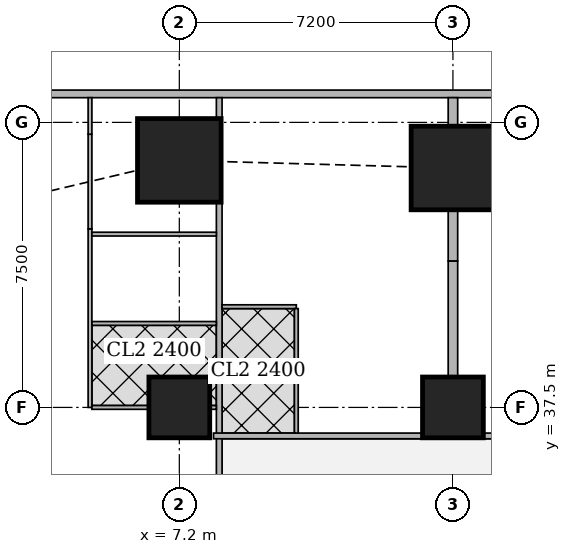
"""IFC4 building model, lengths in metres.
Left out: names, types, materials, properties, quantities, classifications, styles, units other than length and angle.
Written with IfcOpenShell. Run it as: python <this file> out.ifc"""

import sys

from ifc_helpers import new_model, si_unit, direction, frame, frame_2d, origin, origin_2d, place, context, subcontext, project, spatial, rectangle, extrude, element, fill, save


model = new_model("IFC4")
c1 = context("Model", 3, precision=1e-05, world=origin(), true_north=direction((0.0, 1.0)))
c2 = subcontext(c1, "Body", "Model", "MODEL_VIEW")
j1 = project(units=[si_unit("LENGTHUNIT", "METRE"), si_unit("PLANEANGLEUNIT", "RADIAN")], contexts=[c1])
p1 = place(None, origin())
s1 = spatial("IfcSite", under=j1, at=p1, CompositionType="ELEMENT")
p2 = place(p1, origin())
s2 = spatial("IfcBuilding", under=s1, at=p2, CompositionType="ELEMENT")
p3 = place(p2, frame((0.0, 0.0, 81.65)))
s3 = spatial("IfcBuildingStorey", under=s2, at=p3, CompositionType="ELEMENT", Elevation=81.65)
for number, where, z_axis, x_axis in (
    (1, (7.2, 37.5, 0.0), (0.0, 0.0, 1.0), (1.0, 0.0, 0.0)),
    (2, (14.4, 37.5, 0.0), (0.0, 0.0, 1.0), (1.0, 0.0, 0.0)),
):
    element("IfcColumn", number, at=place(p3, frame(where, z_axis=z_axis, x_axis=x_axis)), inside=s3, PredefinedType="COLUMN", context=c2, shape_type="SweptSolid", body=[
        extrude(rectangle(XDim=1.6, YDim=1.6, at=origin_2d()), origin(), (0.0, 0.0, 1.0), 3.75),
    ])
for number, where, z_axis, x_axis in (
    (3, (7.2, 44.0, 0.0), (0.0, 0.0, 1.0), (1.0, 0.0, 0.0)),
    (4, (14.4, 43.8, 0.0), (0.0, 0.0, 1.0), (1.0, 0.0, 0.0)),
):
    element("IfcColumn", number, at=place(p3, frame(where, z_axis=z_axis, x_axis=x_axis)), inside=s3, PredefinedType="COLUMN", context=c2, shape_type="SweptSolid", body=[
        extrude(rectangle(XDim=2.2, YDim=2.2, at=origin_2d()), origin(), (0.0, 0.0, 1.0), 3.75),
    ])
p4 = place(p3, frame((40.106, 45.75, 0.0), z_axis=(0.0, 0.0, 1.0), x_axis=(-1.0, 0.0, 0.0)))
e5 = element("IfcWall", 5, at=p4, inside=s3, PredefinedType="SOLIDWALL", context=c2, shape_type="SweptSolid", body=[
    extrude(rectangle(XDim=37.943, YDim=0.2, at=frame_2d((18.971, 0.0))), origin(), (0.0, 0.0, 1.0), 3.5),
])
p5 = place(p4, frame((8.606, 0.0, 0.9)))
e6 = element("IfcOpeningElement", 6, at=p5, cuts=e5, PredefinedType="OPENING", context=c2, shape_type="SweptSolid", body=[
    extrude(rectangle(XDim=1.8, YDim=1.5, at=frame_2d((0.9, 0.75))), frame((0.0, 0.11, 0.0), z_axis=(0.0, -1.0, 0.0), x_axis=(1.0, 0.0, 0.0)), (0.0, 0.0, 1.0), 0.22),
])
p6 = place(p4, frame((12.206, 0.0, 0.9)))
e7 = element("IfcOpeningElement", 7, at=p6, cuts=e5, PredefinedType="OPENING", context=c2, shape_type="SweptSolid", body=[
    extrude(rectangle(XDim=1.8, YDim=1.5, at=frame_2d((0.9, 0.75))), frame((0.0, 0.11, 0.0), z_axis=(0.0, -1.0, 0.0), x_axis=(1.0, 0.0, 0.0)), (0.0, 0.0, 1.0), 0.22),
])
p7 = place(p4, frame((15.806, 0.0, 0.9)))
e8 = element("IfcOpeningElement", 8, at=p7, cuts=e5, PredefinedType="OPENING", context=c2, shape_type="SweptSolid", body=[
    extrude(rectangle(XDim=1.8, YDim=1.5, at=frame_2d((0.9, 0.75))), frame((0.0, 0.11, 0.0), z_axis=(0.0, -1.0, 0.0), x_axis=(1.0, 0.0, 0.0)), (0.0, 0.0, 1.0), 0.22),
])
p8 = place(p4, frame((19.406, 0.0, 0.9)))
e9 = element("IfcOpeningElement", 9, at=p8, cuts=e5, PredefinedType="OPENING", context=c2, shape_type="SweptSolid", body=[
    extrude(rectangle(XDim=1.8, YDim=1.5, at=frame_2d((0.9, 0.75))), frame((0.0, 0.11, 0.0), z_axis=(0.0, -1.0, 0.0), x_axis=(1.0, 0.0, 0.0)), (0.0, 0.0, 1.0), 0.22),
])
p9 = place(p4, frame((23.006, 0.0, 0.9)))
e10 = element("IfcOpeningElement", 10, at=p9, cuts=e5, PredefinedType="OPENING", context=c2, shape_type="SweptSolid", body=[
    extrude(rectangle(XDim=1.8, YDim=1.5, at=frame_2d((0.9, 0.75))), frame((0.0, 0.11, 0.0), z_axis=(0.0, -1.0, 0.0), x_axis=(1.0, 0.0, 0.0)), (0.0, 0.0, 1.0), 0.22),
])
p10 = place(p4, frame((26.606, 0.0, 0.9)))
e11 = element("IfcOpeningElement", 11, at=p10, cuts=e5, PredefinedType="OPENING", context=c2, shape_type="SweptSolid", body=[
    extrude(rectangle(XDim=1.8, YDim=1.5, at=frame_2d((0.9, 0.75))), frame((0.0, 0.11, 0.0), z_axis=(0.0, -1.0, 0.0), x_axis=(1.0, 0.0, 0.0)), (0.0, 0.0, 1.0), 0.22),
])
p11 = place(p3, frame((8.25, 2.126, 0.0), z_axis=(0.0, 0.0, 1.0), x_axis=(0.0, 1.0, 0.0)))
e12 = element("IfcWall", 12, at=p11, inside=s3, PredefinedType="SOLIDWALL", context=c2, shape_type="SweptSolid", body=[
    extrude(rectangle(XDim=40.773, YDim=0.15, at=frame_2d((20.386, 0.0))), origin(), (0.0, 0.0, 1.0), 3.5),
])
p12 = place(p11, frame((17.787, 0.0, 0.0)))
e13 = element("IfcOpeningElement", 13, at=p12, cuts=e12, PredefinedType="OPENING", context=c2, shape_type="SweptSolid", body=[
    extrude(rectangle(XDim=1.0, YDim=2.1, at=frame_2d((0.5, 1.05))), frame((0.0, 0.085, 0.0), z_axis=(0.0, -1.0, 0.0), x_axis=(1.0, 0.0, 0.0)), (0.0, 0.0, 1.0), 0.17),
])
p13 = place(p11, frame((21.962, 0.0, 0.0)))
e14 = element("IfcOpeningElement", 14, at=p13, cuts=e12, PredefinedType="OPENING", context=c2, shape_type="SweptSolid", body=[
    extrude(rectangle(XDim=1.0, YDim=2.1, at=frame_2d((0.5, 1.05))), frame((0.0, 0.085, 0.0), z_axis=(0.0, -1.0, 0.0), x_axis=(1.0, 0.0, 0.0)), (0.0, 0.0, 1.0), 0.17),
])
p14 = place(p11, frame((32.787, 0.0, 0.0)))
e15 = element("IfcOpeningElement", 15, at=p14, cuts=e12, PredefinedType="OPENING", context=c2, shape_type="SweptSolid", body=[
    extrude(rectangle(XDim=1.0, YDim=2.1, at=frame_2d((0.5, 1.05))), frame((0.0, 0.085, 0.0), z_axis=(0.0, -1.0, 0.0), x_axis=(1.0, 0.0, 0.0)), (0.0, 0.0, 1.0), 0.17),
])
p15 = place(p3, frame((8.25, 45.101, 0.0), z_axis=(0.0, 0.0, 1.0), x_axis=(0.0, 1.0, 0.0)))
e16 = element("IfcWall", 16, at=p15, inside=s3, PredefinedType="SOLIDWALL", context=c2, shape_type="SweptSolid", body=[
    extrude(rectangle(XDim=0.549, YDim=0.15, at=frame_2d((0.274, 0.0))), origin(), (0.0, 0.0, 1.0), 3.5),
])
p16 = place(p3, frame((8.1, 36.75, 0.0), z_axis=(0.0, 0.0, 1.0), x_axis=(1.0, 0.0, 0.0)))
e17 = element("IfcWall", 17, at=p16, inside=s3, PredefinedType="SOLIDWALL", context=c2, shape_type="SweptSolid", body=[
    extrude(rectangle(XDim=5.499, YDim=0.15, at=frame_2d((2.75, 0.0))), origin(), (0.0, 0.0, 1.0), 3.5),
])
p17 = place(p16, frame((3.739, 0.0, 0.0)))
e18 = element("IfcOpeningElement", 18, at=p17, cuts=e17, PredefinedType="OPENING", context=c2, shape_type="SweptSolid", body=[
    extrude(rectangle(XDim=1.0, YDim=2.1, at=frame_2d((0.5, 1.05))), frame((0.0, 0.085, 0.0), z_axis=(0.0, -1.0, 0.0), x_axis=(1.0, 0.0, 0.0)), (0.0, 0.0, 1.0), 0.17),
])
p18 = place(p3, frame((15.201, 36.75, 0.0), z_axis=(0.0, 0.0, 1.0), x_axis=(1.0, 0.0, 0.0)))
e19 = element("IfcWall", 19, at=p18, inside=s3, PredefinedType="SOLIDWALL", context=c2, shape_type="SweptSolid", body=[
    extrude(rectangle(XDim=5.598, YDim=0.15, at=frame_2d((2.799, 0.0))), origin(), (0.0, 0.0, 1.0), 3.5),
])
p19 = place(p18, frame((0.699, 0.0, 0.0)))
e20 = element("IfcOpeningElement", 20, at=p19, cuts=e19, PredefinedType="OPENING", context=c2, shape_type="SweptSolid", body=[
    extrude(rectangle(XDim=1.0, YDim=2.1, at=frame_2d((0.5, 1.05))), frame((0.0, 0.085, 0.0), z_axis=(0.0, -1.0, 0.0), x_axis=(1.0, 0.0, 0.0)), (0.0, 0.0, 1.0), 0.17),
])
p20 = place(p3, frame((4.85, 37.5, 0.0), z_axis=(0.0, 0.0, 1.0), x_axis=(0.0, 1.0, 0.0)))
e21 = element("IfcWall", 21, at=p20, inside=s3, PredefinedType="PARTITIONING", context=c2, shape_type="SweptSolid", body=[
    extrude(rectangle(XDim=4.699, YDim=0.1, at=frame_2d((2.35, 0.0))), origin(), (0.0, 0.0, 1.0), 3.5),
])
p21 = place(p20, frame((0.655, 0.0, 0.0)))
e22 = element("IfcOpeningElement", 22, at=p21, cuts=e21, PredefinedType="OPENING", context=c2, shape_type="SweptSolid", body=[
    extrude(rectangle(XDim=0.9, YDim=2.1, at=frame_2d((0.45, 1.05))), frame((0.0, 0.06, 0.0), z_axis=(0.0, -1.0, 0.0), x_axis=(1.0, 0.0, 0.0)), (0.0, 0.0, 1.0), 0.12),
])
p22 = place(p20, frame((2.53, 0.0, 0.0)))
e23 = element("IfcOpeningElement", 23, at=p22, cuts=e21, PredefinedType="OPENING", context=c2, shape_type="SweptSolid", body=[
    extrude(rectangle(XDim=0.9, YDim=2.1, at=frame_2d((0.45, 1.05))), frame((0.0, 0.06, 0.0), z_axis=(0.0, -1.0, 0.0), x_axis=(1.0, 0.0, 0.0)), (0.0, 0.0, 1.0), 0.12),
])
p23 = place(p3, frame((4.85, 42.199, 0.0), z_axis=(0.0, 0.0, 1.0), x_axis=(0.0, 1.0, 0.0)))
e24 = element("IfcWall", 24, at=p23, inside=s3, PredefinedType="PARTITIONING", context=c2, shape_type="SweptSolid", body=[
    extrude(rectangle(XDim=2.49, YDim=0.1, at=frame_2d((1.245, 0.0))), origin(), (0.0, 0.0, 1.0), 2.05),
])
p24 = place(p3, frame((4.85, 44.689, 0.0), z_axis=(0.0, 0.0, 1.0), x_axis=(0.0, 1.0, 0.0)))
e25 = element("IfcWall", 25, at=p24, inside=s3, PredefinedType="PARTITIONING", context=c2, shape_type="SweptSolid", body=[
    extrude(rectangle(XDim=0.961, YDim=0.1, at=frame_2d((0.48, 0.0))), origin(), (0.0, 0.0, 1.0), 3.5),
])
p25 = place(p3, frame((4.9, 37.5, 0.0), z_axis=(0.0, 0.0, 1.0), x_axis=(1.0, 0.0, 0.0)))
e26 = element("IfcWall", 26, at=p25, inside=s3, PredefinedType="PARTITIONING", context=c2, shape_type="SweptSolid", body=[
    extrude(rectangle(XDim=1.499, YDim=0.1, at=frame_2d((0.75, 0.0))), origin(), (0.0, 0.0, 1.0), 3.5),
])
p26 = place(p3, frame((8.001, 37.5, 0.0), z_axis=(0.0, 0.0, 1.0), x_axis=(1.0, 0.0, 0.0)))
e27 = element("IfcWall", 27, at=p26, inside=s3, PredefinedType="PARTITIONING", context=c2, shape_type="SweptSolid", body=[
    extrude(rectangle(XDim=0.174, YDim=0.1, at=frame_2d((0.087, 0.0))), origin(), (0.0, 0.0, 1.0), 3.5),
])
p27 = place(p3, frame((4.9, 39.71, 0.0), z_axis=(0.0, 0.0, 1.0), x_axis=(1.0, 0.0, 0.0)))
e28 = element("IfcWall", 28, at=p27, inside=s3, PredefinedType="PARTITIONING", context=c2, shape_type="SweptSolid", body=[
    extrude(rectangle(XDim=3.275, YDim=0.1, at=frame_2d((1.638, 0.0))), origin(), (0.0, 0.0, 1.0), 3.5),
])
p28 = place(p3, frame((8.325, 40.15, 0.0), z_axis=(0.0, 0.0, 1.0), x_axis=(1.0, 0.0, 0.0)))
e29 = element("IfcWall", 29, at=p28, inside=s3, PredefinedType="PARTITIONING", context=c2, shape_type="SweptSolid", body=[
    extrude(rectangle(XDim=1.954, YDim=0.1, at=frame_2d((0.977, 0.0))), origin(), (0.0, 0.0, 1.0), 3.5),
])
p29 = place(p28, frame((0.475, 0.0, 0.0)))
e30 = element("IfcOpeningElement", 30, at=p29, cuts=e29, PredefinedType="OPENING", context=c2, shape_type="SweptSolid", body=[
    extrude(rectangle(XDim=0.9, YDim=2.1, at=frame_2d((0.45, 1.05))), frame((0.0, 0.06, 0.0), z_axis=(0.0, -1.0, 0.0), x_axis=(1.0, 0.0, 0.0)), (0.0, 0.0, 1.0), 0.12),
])
p30 = place(p3, frame((10.279, 36.825, 0.0), z_axis=(0.0, 0.0, 1.0), x_axis=(0.0, 1.0, 0.0)))
e31 = element("IfcWall", 31, at=p30, inside=s3, PredefinedType="PARTITIONING", context=c2, shape_type="SweptSolid", body=[
    extrude(rectangle(XDim=3.275, YDim=0.1, at=frame_2d((1.638, 0.0))), origin(), (0.0, 0.0, 1.0), 3.5),
])
p31 = place(p3, frame((14.4, 41.35, 0.0), z_axis=(0.0, 0.0, 1.0), x_axis=(0.0, 1.0, 0.0)))
e32 = element("IfcWall", 32, at=p31, inside=s3, PredefinedType="SOLIDWALL", context=c2, shape_type="SweptSolid", body=[
    extrude(rectangle(XDim=1.349, YDim=0.25, at=frame_2d((0.674, 0.0))), origin(), (0.0, 0.0, 1.0), 3.5),
])
p32 = place(p3, frame((14.4, 44.901, 0.0), z_axis=(0.0, 0.0, 1.0), x_axis=(0.0, 1.0, 0.0)))
e33 = element("IfcWall", 33, at=p32, inside=s3, PredefinedType="SOLIDWALL", context=c2, shape_type="SweptSolid", body=[
    extrude(rectangle(XDim=0.749, YDim=0.25, at=frame_2d((0.375, 0.0))), origin(), (0.0, 0.0, 1.0), 3.5),
])
p33 = place(p3, frame((14.4, 38.301, 0.0), z_axis=(0.0, 0.0, 1.0), x_axis=(0.0, 1.0, 0.0)))
e34 = element("IfcWall", 34, at=p33, inside=s3, PredefinedType="SOLIDWALL", context=c2, shape_type="SweptSolid", body=[
    extrude(rectangle(XDim=3.049, YDim=0.25, at=frame_2d((1.524, 0.0))), origin(), (0.0, 0.0, 1.0), 3.5),
])
p34 = place(p3, frame((8.175, 42.06, 0.0), z_axis=(0.0, 0.0, 1.0), x_axis=(-1.0, 0.0, 0.0)))
e35 = element("IfcWall", 35, at=p34, inside=s3, PredefinedType="PARTITIONING", context=c2, shape_type="SweptSolid", body=[
    extrude(rectangle(XDim=3.275, YDim=0.1, at=frame_2d((1.638, 0.0))), origin(), (0.0, 0.0, 1.0), 3.5),
])
p35 = place(p34, frame((2.1, 0.0, 0.0)))
e36 = element("IfcOpeningElement", 36, at=p35, cuts=e35, PredefinedType="OPENING", context=c2, shape_type="SweptSolid", body=[
    extrude(rectangle(XDim=0.9, YDim=2.1, at=frame_2d((0.45, 1.05))), frame((0.0, 0.06, 0.0), z_axis=(0.0, -1.0, 0.0), x_axis=(1.0, 0.0, 0.0)), (0.0, 0.0, 1.0), 0.12),
])
p36 = place(p9, origin())
e37 = element("IfcWindow", 37, at=p36, inside=s3, PartitioningType="SINGLE_PANEL", PredefinedType="WINDOW", context=c2, shape_type="SweptSolid", body=[
    extrude(rectangle(XDim=1.8, YDim=1.5, at=frame_2d((0.9, 0.75))), frame((0.0, 0.03, 0.0), z_axis=(0.0, -1.0, 0.0), x_axis=(1.0, 0.0, 0.0)), (0.0, 0.0, 1.0), 0.06),
])
fill(e10, e37)
p37 = place(p10, origin())
e38 = element("IfcWindow", 38, at=p37, inside=s3, PartitioningType="SINGLE_PANEL", PredefinedType="WINDOW", context=c2, shape_type="SweptSolid", body=[
    extrude(rectangle(XDim=1.8, YDim=1.5, at=frame_2d((0.9, 0.75))), frame((0.0, 0.03, 0.0), z_axis=(0.0, -1.0, 0.0), x_axis=(1.0, 0.0, 0.0)), (0.0, 0.0, 1.0), 0.06),
])
fill(e11, e38)
p38 = place(p21, origin())
e39 = element("IfcDoor", 39, at=p38, inside=s3, OperationType="SINGLE_SWING_RIGHT", PredefinedType="DOOR", context=c2, shape_type="SweptSolid", body=[
    extrude(rectangle(XDim=0.9, YDim=2.1, at=frame_2d((0.45, 1.05))), frame((0.0, 0.025, 0.0), z_axis=(0.0, -1.0, 0.0), x_axis=(1.0, 0.0, 0.0)), (0.0, 0.0, 1.0), 0.05),
])
fill(e22, e39)
p39 = place(p22, origin())
e40 = element("IfcDoor", 40, at=p39, inside=s3, OperationType="SINGLE_SWING_RIGHT", PredefinedType="DOOR", context=c2, shape_type="SweptSolid", body=[
    extrude(rectangle(XDim=0.9, YDim=2.1, at=frame_2d((0.45, 1.05))), frame((0.0, 0.025, 0.0), z_axis=(0.0, -1.0, 0.0), x_axis=(1.0, 0.0, 0.0)), (0.0, 0.0, 1.0), 0.05),
])
fill(e23, e40)
p40 = place(p14, origin())
e41 = element("IfcDoor", 41, at=p40, inside=s3, OperationType="SINGLE_SWING_LEFT", PredefinedType="DOOR", context=c2, shape_type="SweptSolid", body=[
    extrude(rectangle(XDim=1.0, YDim=2.1, at=frame_2d((0.5, 1.05))), frame((0.0, 0.025, 0.0), z_axis=(0.0, -1.0, 0.0), x_axis=(1.0, 0.0, 0.0)), (0.0, 0.0, 1.0), 0.05),
])
fill(e15, e41)
p41 = place(p29, origin())
e42 = element("IfcDoor", 42, at=p41, inside=s3, OperationType="SINGLE_SWING_RIGHT", PredefinedType="DOOR", context=c2, shape_type="SweptSolid", body=[
    extrude(rectangle(XDim=0.9, YDim=2.1, at=frame_2d((0.45, 1.05))), frame((0.0, 0.025, 0.0), z_axis=(0.0, -1.0, 0.0), x_axis=(1.0, 0.0, 0.0)), (0.0, 0.0, 1.0), 0.05),
])
fill(e30, e42)
p42 = place(p17, origin())
e43 = element("IfcDoor", 43, at=p42, inside=s3, OperationType="SINGLE_SWING_RIGHT", PredefinedType="DOOR", context=c2, shape_type="SweptSolid", body=[
    extrude(rectangle(XDim=1.0, YDim=2.1, at=frame_2d((0.5, 1.05))), frame((0.0, 0.025, 0.0), z_axis=(0.0, -1.0, 0.0), x_axis=(1.0, 0.0, 0.0)), (0.0, 0.0, 1.0), 0.05),
])
fill(e18, e43)
p43 = place(p35, origin())
e44 = element("IfcDoor", 44, at=p43, inside=s3, OperationType="SINGLE_SWING_LEFT", PredefinedType="DOOR", context=c2, shape_type="SweptSolid", body=[
    extrude(rectangle(XDim=0.9, YDim=2.1, at=frame_2d((0.45, 1.05))), frame((0.0, 0.025, 0.0), z_axis=(0.0, -1.0, 0.0), x_axis=(1.0, 0.0, 0.0)), (0.0, 0.0, 1.0), 0.05),
])
fill(e36, e44)
save(model, sys.argv[1])
